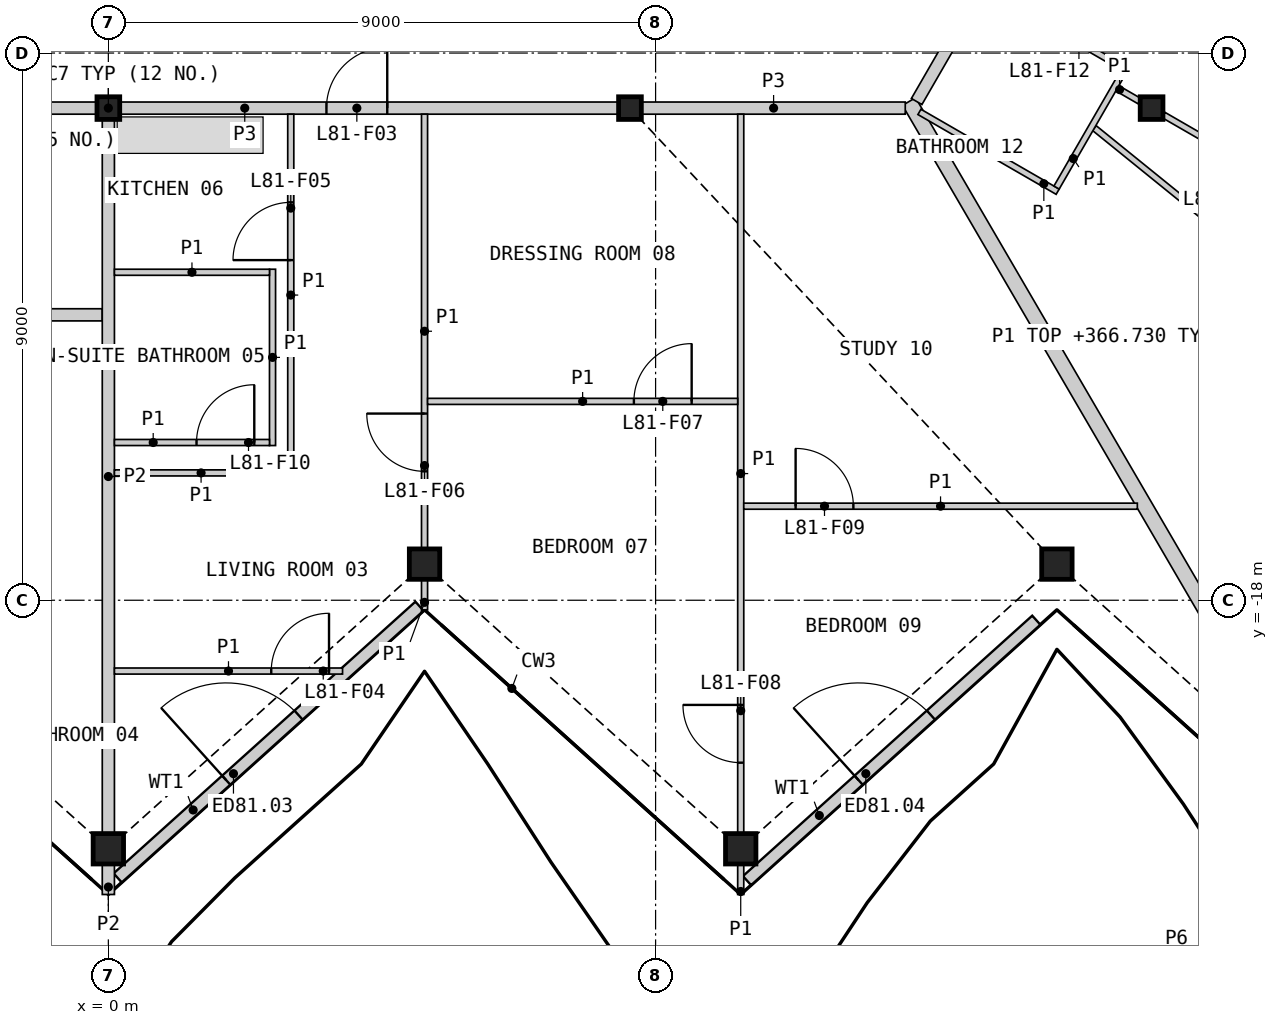
"""IFC4 building model, lengths in metres.
Left out: names, types, materials, properties, quantities, classifications, styles, units other than length and angle.
Written with IfcOpenShell. Run it as: python <this file> out.ifc"""

import sys

from ifc_helpers import new_model, si_unit, direction, frame, frame_2d, origin, origin_2d, place, context, subcontext, project, spatial, rectangle, hollow_rectangle, i_section, extrude, element, fill, save


model = new_model("IFC4")
c1 = context("Model", 3, precision=1e-05, world=origin(), true_north=direction((0.0, 1.0)))
c2 = subcontext(c1, "Body", "Model", "MODEL_VIEW")
j1 = project(units=[si_unit("LENGTHUNIT", "METRE"), si_unit("PLANEANGLEUNIT", "RADIAN")], contexts=[c1])
p1 = place(None, origin())
s1 = spatial("IfcSite", under=j1, at=p1, CompositionType="ELEMENT")
p2 = place(p1, origin())
s2 = spatial("IfcBuilding", under=s1, at=p2, CompositionType="ELEMENT")
p3 = place(p2, frame((0.0, 0.0, 364.4)))
s3 = spatial("IfcBuildingStorey", under=s2, at=p3, CompositionType="ELEMENT", Elevation=364.4)
for number, where, z_axis, x_axis in (
    (1, (0.0, -22.088, 0.0), (0.0, 0.0, 1.0), (1.0, 0.0, 0.0)),
    (2, (5.2, -17.406, 0.0), (0.0, 0.0, 1.0), (1.0, 0.0, 0.0)),
    (3, (10.4, -22.088, 0.0), (0.0, 0.0, 1.0), (1.0, 0.0, 0.0)),
    (4, (15.6, -17.406, 0.0), (0.0, 0.0, 1.0), (1.0, 0.0, 0.0)),
):
    element("IfcColumn", number, at=place(p3, frame(where, z_axis=z_axis, x_axis=x_axis)), inside=s3, PredefinedType="COLUMN", context=c2, shape_type="SweptSolid", body=[
        extrude(hollow_rectangle(XDim=0.5, YDim=0.5, WallThickness=0.03, at=origin_2d()), origin(), (0.0, 0.0, 1.0), 3.4),
    ])
for number, where, z_axis, x_axis in (
    (5, (0.0, -9.906, 0.0), (0.0, 0.0, 1.0), (1.0, 0.0, 0.0)),
    (6, (8.578, -9.906, 0.0), (0.0, 0.0, 1.0), (1.0, 0.0, 0.0)),
    (7, (17.157, -9.906, 0.0), (0.0, 0.0, 1.0), (1.0, 0.0, 0.0)),
):
    element("IfcColumn", number, at=place(p3, frame(where, z_axis=z_axis, x_axis=x_axis)), inside=s3, PredefinedType="COLUMN", context=c2, shape_type="SweptSolid", body=[
        extrude(i_section(OverallWidth=0.374, OverallDepth=0.372, WebThickness=0.016, FlangeThickness=0.026, at=origin_2d()), origin(), (0.0, 0.0, 1.0), 3.4),
    ])
p4 = place(p3, frame((0.154, -22.567, 0.0), z_axis=(0.0, 0.0, 1.0), x_axis=(0.743150529995, 0.669124270796, 0.0)))
e8 = element("IfcWall", 8, at=p4, inside=s3, PredefinedType="SOLIDWALL", context=c2, shape_type="SweptSolid", body=[
    extrude(rectangle(XDim=6.678, YDim=0.2, at=frame_2d((3.339, 0.0))), origin(), (0.0, 0.0, 1.0), 2.634),
])
p5 = place(p4, frame((2.402, 0.0, 0.0)))
e9 = element("IfcOpeningElement", 9, at=p5, cuts=e8, PredefinedType="OPENING", context=c2, shape_type="SweptSolid", body=[
    extrude(rectangle(XDim=1.6, YDim=2.25, at=frame_2d((0.8, 1.125))), frame((0.0, 0.11, 0.0), z_axis=(0.0, -1.0, 0.0), x_axis=(1.0, 0.0, 0.0)), (0.0, 0.0, 1.0), 0.22),
])
p6 = place(p3, frame((10.503, -22.612, 0.0), z_axis=(0.0, 0.0, 1.0), x_axis=(0.743148117717, 0.669126949939, 0.0)))
e10 = element("IfcWall", 10, at=p6, inside=s3, PredefinedType="SOLIDWALL", context=c2, shape_type="SweptSolid", body=[
    extrude(rectangle(XDim=6.402, YDim=0.2, at=frame_2d((3.201, 0.0))), origin(), (0.0, 0.0, 1.0), 2.634),
])
p7 = place(p6, frame((2.469, 0.0, 0.0)))
e11 = element("IfcOpeningElement", 11, at=p7, cuts=e10, PredefinedType="OPENING", context=c2, shape_type="SweptSolid", body=[
    extrude(rectangle(XDim=1.6, YDim=2.25, at=frame_2d((0.8, 1.125))), frame((0.0, 0.11, 0.0), z_axis=(0.0, -1.0, 0.0), x_axis=(1.0, 0.0, 0.0)), (0.0, 0.0, 1.0), 0.22),
])
p8 = place(p3, frame((13.168, -9.798, 0.0), z_axis=(0.0, 0.0, 1.0), x_axis=(0.503632750219, -0.863917850786, 0.0)))
e12 = element("IfcWall", 12, at=p8, inside=s3, PredefinedType="PARTITIONING", context=c2, shape_type="SweptSolid", body=[
    extrude(rectangle(XDim=14.972, YDim=0.25, at=frame_2d((7.486, 0.0))), origin(), (0.0, 0.0, 1.0), 2.33),
])
p9 = place(p3, frame((-8.382, -9.906, 0.0), z_axis=(0.0, 0.0, 1.0), x_axis=(1.0, 0.0, 0.0)))
e13 = element("IfcWall", 13, at=p9, inside=s3, PredefinedType="PARTITIONING", context=c2, shape_type="SweptSolid", body=[
    extrude(rectangle(XDim=8.185, YDim=0.2, at=frame_2d((4.092, 0.0))), origin(), (0.0, 0.0, 1.0), 3.1),
])
p10 = place(p9, frame((3.567, 0.0, 0.0)))
e14 = element("IfcOpeningElement", 14, at=p10, cuts=e13, PredefinedType="OPENING", context=c2, shape_type="SweptSolid", body=[
    extrude(rectangle(XDim=0.95, YDim=2.1, at=frame_2d((0.475, 1.05))), frame((0.0, 0.11, 0.0), z_axis=(0.0, -1.0, 0.0), x_axis=(1.0, 0.0, 0.0)), (0.0, 0.0, 1.0), 0.22),
])
p11 = place(p3, frame((0.197, -9.906, 0.0), z_axis=(0.0, 0.0, 1.0), x_axis=(1.0, 0.0, 0.0)))
e15 = element("IfcWall", 15, at=p11, inside=s3, PredefinedType="PARTITIONING", context=c2, shape_type="SweptSolid", body=[
    extrude(rectangle(XDim=8.185, YDim=0.2, at=frame_2d((4.092, 0.0))), origin(), (0.0, 0.0, 1.0), 3.1),
])
p12 = place(p11, frame((3.39, 0.0, 0.0)))
e16 = element("IfcOpeningElement", 16, at=p12, cuts=e15, PredefinedType="OPENING", context=c2, shape_type="SweptSolid", body=[
    extrude(rectangle(XDim=1.0, YDim=2.1, at=frame_2d((0.5, 1.05))), frame((0.0, 0.11, 0.0), z_axis=(0.0, -1.0, 0.0), x_axis=(1.0, 0.0, 0.0)), (0.0, 0.0, 1.0), 0.22),
])
p13 = place(p3, frame((8.775, -9.906, 0.0), z_axis=(0.0, 0.0, 1.0), x_axis=(1.0, 0.0, 0.0)))
e17 = element("IfcWall", 17, at=p13, inside=s3, PredefinedType="PARTITIONING", context=c2, shape_type="SweptSolid", body=[
    extrude(rectangle(XDim=4.331, YDim=0.2, at=frame_2d((2.165, 0.0))), origin(), (0.0, 0.0, 1.0), 3.1),
])
p14 = place(p3, frame((13.293, -9.797, 0.0), z_axis=(0.0, 0.0, 1.0), x_axis=(0.499977520935, 0.86603838169, 0.0)))
e18 = element("IfcWall", 18, at=p14, inside=s3, PredefinedType="PARTITIONING", context=c2, shape_type="SweptSolid", body=[
    extrude(rectangle(XDim=3.701, YDim=0.2, at=frame_2d((1.851, 0.0))), origin(), (0.0, 0.0, 1.0), 3.1),
])
p15 = place(p14, frame((2.451, 0.0, 0.0)))
e19 = element("IfcOpeningElement", 19, at=p15, cuts=e18, PredefinedType="OPENING", context=c2, shape_type="SweptSolid", body=[
    extrude(rectangle(XDim=1.0, YDim=2.1, at=frame_2d((0.5, 1.05))), frame((0.0, 0.11, 0.0), z_axis=(0.0, -1.0, 0.0), x_axis=(1.0, 0.0, 0.0)), (0.0, 0.0, 1.0), 0.22),
])
p16 = place(p3, frame((-15.094, -13.306, 0.0), z_axis=(0.0, 0.0, 1.0), x_axis=(1.0, 0.0, 0.0)))
e20 = element("IfcWall", 20, at=p16, inside=s3, PredefinedType="PARTITIONING", context=c2, shape_type="SweptSolid", body=[
    extrude(rectangle(XDim=14.994, YDim=0.2, at=frame_2d((7.497, 0.0))), origin(), (0.0, 0.0, 1.0), 2.33),
])
p17 = place(p16, frame((6.27, 0.0, 0.0)))
e21 = element("IfcOpeningElement", 21, at=p17, cuts=e20, PredefinedType="OPENING", context=c2, shape_type="SweptSolid", body=[
    extrude(rectangle(XDim=0.95, YDim=2.1, at=frame_2d((0.475, 1.05))), frame((0.0, 0.11, 0.0), z_axis=(0.0, -1.0, 0.0), x_axis=(1.0, 0.0, 0.0)), (0.0, 0.0, 1.0), 0.22),
])
p18 = place(p3, frame((0.0, -21.828, 0.0), z_axis=(0.0, 0.0, 1.0), x_axis=(0.0, 1.0, 0.0)))
e22 = element("IfcWall", 22, at=p18, inside=s3, PredefinedType="PARTITIONING", context=c2, shape_type="SweptSolid", body=[
    extrude(rectangle(XDim=11.725, YDim=0.2, at=frame_2d((5.863, 0.0))), origin(), (0.0, 0.0, 1.0), 2.33),
])
p19 = place(p3, frame((0.0, -22.839, 0.0), z_axis=(0.0, 0.0, 1.0), x_axis=(0.0, 1.0, 0.0)))
e23 = element("IfcWall", 23, at=p19, inside=s3, PredefinedType="PARTITIONING", context=c2, shape_type="SweptSolid", body=[
    extrude(rectangle(XDim=0.491, YDim=0.2, at=frame_2d((0.246, 0.0))), origin(), (0.0, 0.0, 1.0), 2.33),
])
p20 = place(p3, frame((16.216, -10.234, 0.0), z_axis=(0.0, 0.0, 1.0), x_axis=(0.777145059662, -0.629321504672, 0.0)))
e24 = element("IfcWall", 24, at=p20, inside=s3, PredefinedType="PARTITIONING", context=c2, shape_type="SweptSolid", body=[
    extrude(rectangle(XDim=12.59, YDim=0.1, at=frame_2d((6.295, 0.0))), origin(), (0.0, 0.0, 1.0), 2.33),
])
p21 = place(p20, frame((7.074, 0.0, 0.0)))
e25 = element("IfcOpeningElement", 25, at=p21, cuts=e24, PredefinedType="OPENING", context=c2, shape_type="SweptSolid", body=[
    extrude(rectangle(XDim=0.95, YDim=2.1, at=frame_2d((0.475, 1.05))), frame((0.0, 0.06, 0.0), z_axis=(0.0, -1.0, 0.0), x_axis=(1.0, 0.0, 0.0)), (0.0, 0.0, 1.0), 0.12),
])
p22 = place(p3, frame((10.4, -21.828, 0.0), z_axis=(0.0, 0.0, 1.0), x_axis=(0.0, 1.0, 0.0)))
e26 = element("IfcWall", 26, at=p22, inside=s3, PredefinedType="PARTITIONING", context=c2, shape_type="SweptSolid", body=[
    extrude(rectangle(XDim=11.822, YDim=0.1, at=frame_2d((5.911, 0.0))), origin(), (0.0, 0.0, 1.0), 2.33),
])
p23 = place(p22, frame((1.156, 0.0, 0.0)))
e27 = element("IfcOpeningElement", 27, at=p23, cuts=e26, PredefinedType="OPENING", context=c2, shape_type="SweptSolid", body=[
    extrude(rectangle(XDim=0.95, YDim=2.1, at=frame_2d((0.475, 1.05))), frame((0.0, 0.06, 0.0), z_axis=(0.0, -1.0, 0.0), x_axis=(1.0, 0.0, 0.0)), (0.0, 0.0, 1.0), 0.12),
])
p24 = place(p3, frame((17.354, -10.019, 0.0), z_axis=(0.0, 0.0, 1.0), x_axis=(0.866019680922, -0.500009912158, 0.0)))
e28 = element("IfcWall", 28, at=p24, inside=s3, PredefinedType="PARTITIONING", context=c2, shape_type="SweptSolid", body=[
    extrude(rectangle(XDim=10.881, YDim=0.1, at=frame_2d((5.44, 0.0))), origin(), (0.0, 0.0, 1.0), 2.33),
])
p25 = place(p24, frame((1.655, 0.0, 0.0)))
e29 = element("IfcOpeningElement", 29, at=p25, cuts=e28, PredefinedType="OPENING", context=c2, shape_type="SweptSolid", body=[
    extrude(rectangle(XDim=0.95, YDim=2.1, at=frame_2d((0.475, 1.05))), frame((0.0, 0.06, 0.0), z_axis=(0.0, -1.0, 0.0), x_axis=(1.0, 0.0, 0.0)), (0.0, 0.0, 1.0), 0.12),
])
p26 = place(p3, frame((5.2, -17.146, 0.0), z_axis=(0.0, 0.0, 1.0), x_axis=(0.0, 1.0, 0.0)))
e30 = element("IfcWall", 30, at=p26, inside=s3, PredefinedType="PARTITIONING", context=c2, shape_type="SweptSolid", body=[
    extrude(rectangle(XDim=7.14, YDim=0.1, at=frame_2d((3.57, 0.0))), origin(), (0.0, 0.0, 1.0), 2.33),
])
p27 = place(p26, frame((1.266, 0.0, 0.0)))
e31 = element("IfcOpeningElement", 31, at=p27, cuts=e30, PredefinedType="OPENING", context=c2, shape_type="SweptSolid", body=[
    extrude(rectangle(XDim=0.95, YDim=2.1, at=frame_2d((0.475, 1.05))), frame((0.0, 0.06, 0.0), z_axis=(0.0, -1.0, 0.0), x_axis=(1.0, 0.0, 0.0)), (0.0, 0.0, 1.0), 0.12),
])
p28 = place(p3, frame((10.45, -16.453, 0.0), z_axis=(0.0, 0.0, 1.0), x_axis=(1.0, 0.0, 0.0)))
e32 = element("IfcWall", 32, at=p28, inside=s3, PredefinedType="PARTITIONING", context=c2, shape_type="SweptSolid", body=[
    extrude(rectangle(XDim=6.473, YDim=0.1, at=frame_2d((3.236, 0.0))), origin(), (0.0, 0.0, 1.0), 2.33),
])
p29 = place(p28, frame((0.853, 0.0, 0.0)))
e33 = element("IfcOpeningElement", 33, at=p29, cuts=e32, PredefinedType="OPENING", context=c2, shape_type="SweptSolid", body=[
    extrude(rectangle(XDim=0.95, YDim=2.1, at=frame_2d((0.475, 1.05))), frame((0.0, 0.06, 0.0), z_axis=(0.0, -1.0, 0.0), x_axis=(1.0, 0.0, 0.0)), (0.0, 0.0, 1.0), 0.12),
])
p30 = place(p3, frame((3.0, -15.956, 0.0), z_axis=(0.0, 0.0, 1.0), x_axis=(0.0, 1.0, 0.0)))
e34 = element("IfcWall", 34, at=p30, inside=s3, PredefinedType="PARTITIONING", context=c2, shape_type="SweptSolid", body=[
    extrude(rectangle(XDim=5.95, YDim=0.1, at=frame_2d((2.975, 0.0))), origin(), (0.0, 0.0, 1.0), 2.33),
])
p31 = place(p30, frame((3.55, 0.0, 0.0)))
e35 = element("IfcOpeningElement", 35, at=p31, cuts=e34, PredefinedType="OPENING", context=c2, shape_type="SweptSolid", body=[
    extrude(rectangle(XDim=0.95, YDim=2.1, at=frame_2d((0.475, 1.05))), frame((0.0, 0.06, 0.0), z_axis=(0.0, -1.0, 0.0), x_axis=(1.0, 0.0, 0.0)), (0.0, 0.0, 1.0), 0.12),
])
p32 = place(p3, frame((5.25, -14.729, 0.0), z_axis=(0.0, 0.0, 1.0), x_axis=(1.0, 0.0, 0.0)))
e36 = element("IfcWall", 36, at=p32, inside=s3, PredefinedType="PARTITIONING", context=c2, shape_type="SweptSolid", body=[
    extrude(rectangle(XDim=5.1, YDim=0.1, at=frame_2d((2.55, 0.0))), origin(), (0.0, 0.0, 1.0), 2.33),
])
p33 = place(p32, frame((3.393, 0.0, 0.0)))
e37 = element("IfcOpeningElement", 37, at=p33, cuts=e36, PredefinedType="OPENING", context=c2, shape_type="SweptSolid", body=[
    extrude(rectangle(XDim=0.95, YDim=2.1, at=frame_2d((0.475, 1.05))), frame((0.0, 0.06, 0.0), z_axis=(0.0, -1.0, 0.0), x_axis=(1.0, 0.0, 0.0)), (0.0, 0.0, 1.0), 0.12),
])
p34 = place(p3, frame((0.1, -19.164, 0.0), z_axis=(0.0, 0.0, 1.0), x_axis=(1.0, 0.0, 0.0)))
e38 = element("IfcWall", 38, at=p34, inside=s3, PredefinedType="PARTITIONING", context=c2, shape_type="SweptSolid", body=[
    extrude(rectangle(XDim=3.751, YDim=0.1, at=frame_2d((1.876, 0.0))), origin(), (0.0, 0.0, 1.0), 2.33),
])
p35 = place(p34, frame((2.579, 0.0, 0.0)))
e39 = element("IfcOpeningElement", 39, at=p35, cuts=e38, PredefinedType="OPENING", context=c2, shape_type="SweptSolid", body=[
    extrude(rectangle(XDim=0.95, YDim=2.1, at=frame_2d((0.475, 1.05))), frame((0.0, 0.06, 0.0), z_axis=(0.0, -1.0, 0.0), x_axis=(1.0, 0.0, 0.0)), (0.0, 0.0, 1.0), 0.12),
])
p36 = place(p3, frame((0.1, -15.906, 0.0), z_axis=(0.0, 0.0, 1.0), x_axis=(1.0, 0.0, 0.0)))
e40 = element("IfcWall", 40, at=p36, inside=s3, PredefinedType="PARTITIONING", context=c2, shape_type="SweptSolid", body=[
    extrude(rectangle(XDim=2.85, YDim=0.1, at=frame_2d((1.425, 0.0))), origin(), (0.0, 0.0, 1.0), 2.33),
])
p37 = place(p3, frame((2.7, -15.456, 0.0), z_axis=(0.0, 0.0, 1.0), x_axis=(0.0, 1.0, 0.0)))
e41 = element("IfcWall", 41, at=p37, inside=s3, PredefinedType="PARTITIONING", context=c2, shape_type="SweptSolid", body=[
    extrude(rectangle(XDim=2.9, YDim=0.1, at=frame_2d((1.45, 0.0))), origin(), (0.0, 0.0, 1.0), 2.33),
])
p38 = place(p3, frame((14.467, -7.964, 0.0), z_axis=(0.0, 0.0, 1.0), x_axis=(0.86601223543, -0.500022807565, 0.0)))
e42 = element("IfcWall", 42, at=p38, inside=s3, PredefinedType="PARTITIONING", context=c2, shape_type="SweptSolid", body=[
    extrude(rectangle(XDim=2.65, YDim=0.1, at=frame_2d((1.325, 0.0))), origin(), (0.0, 0.0, 1.0), 2.33),
])
p39 = place(p38, frame((1.014, 0.0, 0.0)))
e43 = element("IfcOpeningElement", 43, at=p39, cuts=e42, PredefinedType="OPENING", context=c2, shape_type="SweptSolid", body=[
    extrude(rectangle(XDim=0.95, YDim=2.1, at=frame_2d((0.475, 1.05))), frame((0.0, 0.06, 0.0), z_axis=(0.0, -1.0, 0.0), x_axis=(1.0, 0.0, 0.0)), (0.0, 0.0, 1.0), 0.12),
])
p40 = place(p3, frame((0.1, -12.606, 0.0), z_axis=(0.0, 0.0, 1.0), x_axis=(1.0, 0.0, 0.0)))
e44 = element("IfcWall", 44, at=p40, inside=s3, PredefinedType="PARTITIONING", context=c2, shape_type="SweptSolid", body=[
    extrude(rectangle(XDim=2.55, YDim=0.1, at=frame_2d((1.275, 0.0))), origin(), (0.0, 0.0, 1.0), 2.33),
])
p41 = place(p3, frame((0.1, -15.406, 0.0), z_axis=(0.0, 0.0, 1.0), x_axis=(1.0, 0.0, 0.0)))
e45 = element("IfcWall", 45, at=p41, inside=s3, PredefinedType="PARTITIONING", context=c2, shape_type="SweptSolid", body=[
    extrude(rectangle(XDim=2.55, YDim=0.1, at=frame_2d((1.275, 0.0))), origin(), (0.0, 0.0, 1.0), 2.33),
])
p42 = place(p41, frame((1.35, 0.0, 0.0)))
e46 = element("IfcOpeningElement", 46, at=p42, cuts=e45, PredefinedType="OPENING", context=c2, shape_type="SweptSolid", body=[
    extrude(rectangle(XDim=0.95, YDim=2.1, at=frame_2d((0.475, 1.05))), frame((0.0, 0.06, 0.0), z_axis=(0.0, -1.0, 0.0), x_axis=(1.0, 0.0, 0.0)), (0.0, 0.0, 1.0), 0.12),
])
p43 = place(p3, frame((13.339, -9.968, 0.0), z_axis=(0.0, 0.0, 1.0), x_axis=(0.866013657776, -0.500020344131, 0.0)))
e47 = element("IfcWall", 47, at=p43, inside=s3, PredefinedType="PARTITIONING", context=c2, shape_type="SweptSolid", body=[
    extrude(rectangle(XDim=2.625, YDim=0.1, at=frame_2d((1.312, 0.0))), origin(), (0.0, 0.0, 1.0), 2.33),
])
p44 = place(p3, frame((15.594, -11.212, 0.0), z_axis=(0.0, 0.0, 1.0), x_axis=(0.499981787252, 0.866035918664, 0.0)))
e48 = element("IfcWall", 48, at=p44, inside=s3, PredefinedType="PARTITIONING", context=c2, shape_type="SweptSolid", body=[
    extrude(rectangle(XDim=2.2, YDim=0.1, at=frame_2d((1.1, 0.0))), origin(), (0.0, 0.0, 1.0), 2.33),
])
for number, where, z_axis, x_axis in (
    (49, (10.4, -22.839, 0.0), (0.0, 0.0, 1.0), (0.0, 1.0, 0.0)),
    (50, (5.2, -18.157, 0.0), (0.0, 0.0, 1.0), (0.0, 1.0, 0.0)),
):
    element("IfcWall", number, at=place(p3, frame(where, z_axis=z_axis, x_axis=x_axis)), inside=s3, PredefinedType="PARTITIONING", context=c2, shape_type="SweptSolid", body=[
        extrude(rectangle(XDim=0.491, YDim=0.1, at=frame_2d((0.246, 0.0))), origin(), (0.0, 0.0, 1.0), 2.33),
    ])
p45 = place(p3, frame((16.594, -9.581, 0.0), z_axis=(0.0, 0.0, 1.0), x_axis=(0.866137484628, -0.499805820016, 0.0)))
e51 = element("IfcWall", 51, at=p45, inside=s3, PredefinedType="PARTITIONING", context=c2, shape_type="SweptSolid", body=[
    extrude(rectangle(XDim=0.423, YDim=0.1, at=frame_2d((0.211, 0.0))), origin(), (0.0, 0.0, 1.0), 2.33),
])
p46 = place(p5, origin())
e52 = element("IfcDoor", 52, at=p46, inside=s3, OperationType="DOUBLE_DOOR_SINGLE_SWING", PredefinedType="DOOR", context=c2, shape_type="SweptSolid", body=[
    extrude(rectangle(XDim=1.6, YDim=2.25, at=frame_2d((0.8, 1.125))), frame((0.0, 0.025, 0.0), z_axis=(0.0, -1.0, 0.0), x_axis=(1.0, 0.0, 0.0)), (0.0, 0.0, 1.0), 0.05),
])
fill(e9, e52)
p47 = place(p7, origin())
e53 = element("IfcDoor", 53, at=p47, inside=s3, OperationType="DOUBLE_DOOR_SINGLE_SWING", PredefinedType="DOOR", context=c2, shape_type="SweptSolid", body=[
    extrude(rectangle(XDim=1.6, YDim=2.25, at=frame_2d((0.8, 1.125))), frame((0.0, 0.025, 0.0), z_axis=(0.0, -1.0, 0.0), x_axis=(1.0, 0.0, 0.0)), (0.0, 0.0, 1.0), 0.05),
])
fill(e11, e53)
p48 = place(p12, origin())
e54 = element("IfcDoor", 54, at=p48, inside=s3, OperationType="SINGLE_SWING_RIGHT", PredefinedType="DOOR", context=c2, shape_type="SweptSolid", body=[
    extrude(rectangle(XDim=1.0, YDim=2.1, at=frame_2d((0.5, 1.05))), frame((0.0, 0.025, 0.0), z_axis=(0.0, -1.0, 0.0), x_axis=(1.0, 0.0, 0.0)), (0.0, 0.0, 1.0), 0.05),
])
fill(e16, e54)
p49 = place(p35, origin())
e55 = element("IfcDoor", 55, at=p49, inside=s3, OperationType="SINGLE_SWING_RIGHT", PredefinedType="DOOR", context=c2, shape_type="SweptSolid", body=[
    extrude(rectangle(XDim=0.95, YDim=2.1, at=frame_2d((0.475, 1.05))), frame((0.0, 0.025, 0.0), z_axis=(0.0, -1.0, 0.0), x_axis=(1.0, 0.0, 0.0)), (0.0, 0.0, 1.0), 0.05),
])
fill(e39, e55)
p50 = place(p31, origin())
e56 = element("IfcDoor", 56, at=p50, inside=s3, OperationType="SINGLE_SWING_LEFT", PredefinedType="DOOR", context=c2, shape_type="SweptSolid", body=[
    extrude(rectangle(XDim=0.95, YDim=2.1, at=frame_2d((0.475, 1.05))), frame((0.0, 0.025, 0.0), z_axis=(0.0, -1.0, 0.0), x_axis=(1.0, 0.0, 0.0)), (0.0, 0.0, 1.0), 0.05),
])
fill(e35, e56)
p51 = place(p27, origin())
e57 = element("IfcDoor", 57, at=p51, inside=s3, OperationType="SINGLE_SWING_RIGHT", PredefinedType="DOOR", context=c2, shape_type="SweptSolid", body=[
    extrude(rectangle(XDim=0.95, YDim=2.1, at=frame_2d((0.475, 1.05))), frame((0.0, 0.025, 0.0), z_axis=(0.0, -1.0, 0.0), x_axis=(1.0, 0.0, 0.0)), (0.0, 0.0, 1.0), 0.05),
])
fill(e31, e57)
p52 = place(p33, origin())
e58 = element("IfcDoor", 58, at=p52, inside=s3, OperationType="SINGLE_SWING_RIGHT", PredefinedType="DOOR", context=c2, shape_type="SweptSolid", body=[
    extrude(rectangle(XDim=0.95, YDim=2.1, at=frame_2d((0.475, 1.05))), frame((0.0, 0.025, 0.0), z_axis=(0.0, -1.0, 0.0), x_axis=(1.0, 0.0, 0.0)), (0.0, 0.0, 1.0), 0.05),
])
fill(e37, e58)
p53 = place(p23, origin())
e59 = element("IfcDoor", 59, at=p53, inside=s3, OperationType="SINGLE_SWING_RIGHT", PredefinedType="DOOR", context=c2, shape_type="SweptSolid", body=[
    extrude(rectangle(XDim=0.95, YDim=2.1, at=frame_2d((0.475, 1.05))), frame((0.0, 0.025, 0.0), z_axis=(0.0, -1.0, 0.0), x_axis=(1.0, 0.0, 0.0)), (0.0, 0.0, 1.0), 0.05),
])
fill(e27, e59)
p54 = place(p29, origin())
e60 = element("IfcDoor", 60, at=p54, inside=s3, OperationType="SINGLE_SWING_LEFT", PredefinedType="DOOR", context=c2, shape_type="SweptSolid", body=[
    extrude(rectangle(XDim=0.95, YDim=2.1, at=frame_2d((0.475, 1.05))), frame((0.0, 0.025, 0.0), z_axis=(0.0, -1.0, 0.0), x_axis=(1.0, 0.0, 0.0)), (0.0, 0.0, 1.0), 0.05),
])
fill(e33, e60)
p55 = place(p42, origin())
e61 = element("IfcDoor", 61, at=p55, inside=s3, OperationType="SINGLE_SWING_RIGHT", PredefinedType="DOOR", context=c2, shape_type="SweptSolid", body=[
    extrude(rectangle(XDim=0.95, YDim=2.1, at=frame_2d((0.475, 1.05))), frame((0.0, 0.025, 0.0), z_axis=(0.0, -1.0, 0.0), x_axis=(1.0, 0.0, 0.0)), (0.0, 0.0, 1.0), 0.05),
])
fill(e46, e61)
save(model, sys.argv[1])
